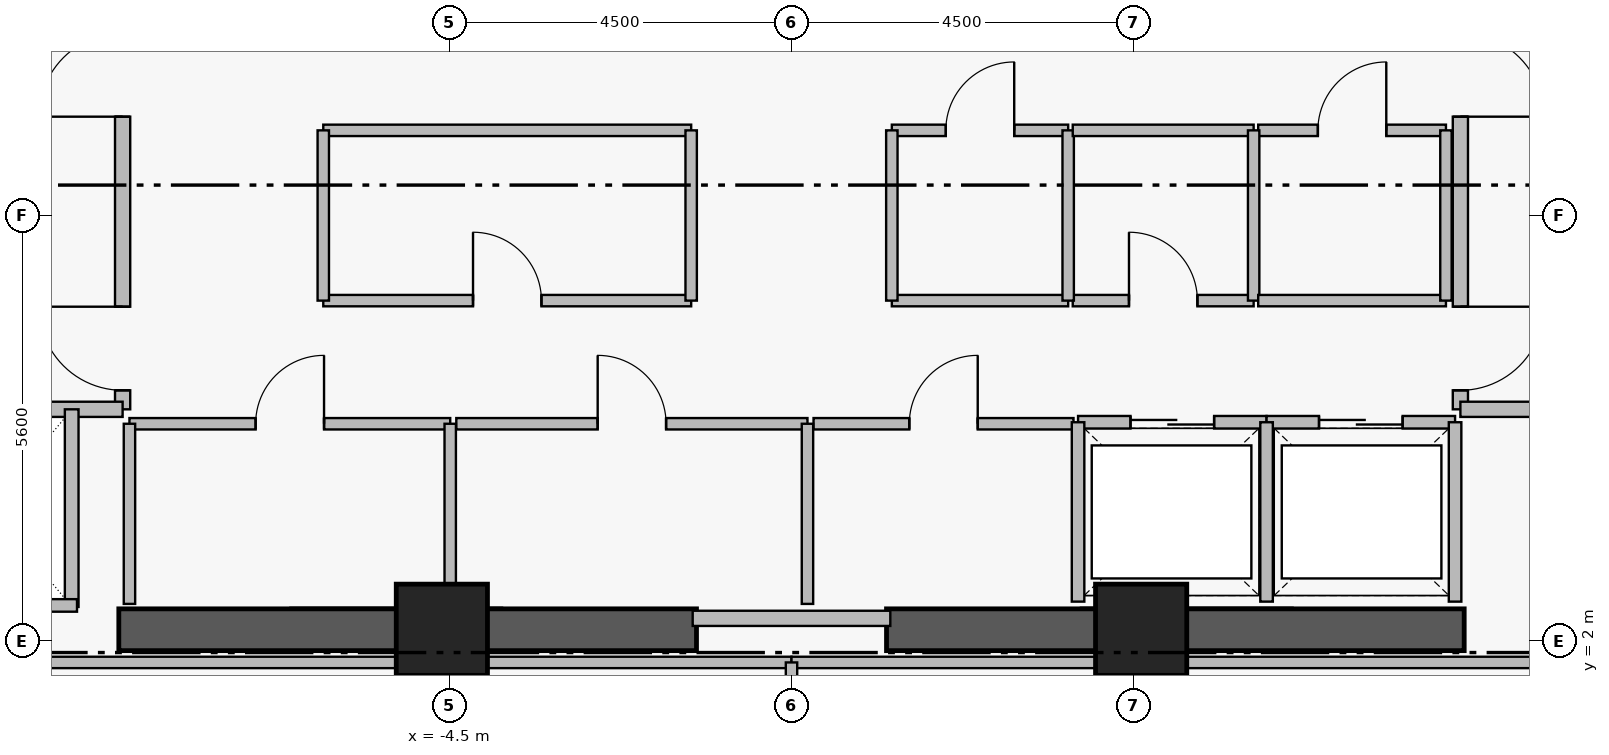
"""IFC4 building model, lengths in metres.
Left out: names, types, materials, properties, quantities, classifications, styles, units other than length and angle.
Written with IfcOpenShell. Run it as: python <this file> out.ifc"""

import sys

from ifc_helpers import new_model, si_unit, direction, frame, frame_2d, origin, origin_2d, place, context, subcontext, project, spatial, rectangle, extrude, element, fill, save


model = new_model("IFC4")
c1 = context("Model", 3, precision=1e-05, world=origin(), true_north=direction((0.0, 1.0)))
c2 = subcontext(c1, "Body", "Model", "MODEL_VIEW")
j1 = project(units=[si_unit("LENGTHUNIT", "METRE"), si_unit("PLANEANGLEUNIT", "RADIAN")], contexts=[c1])
p1 = place(None, origin())
s1 = spatial("IfcSite", under=j1, at=p1, CompositionType="ELEMENT")
p2 = place(p1, origin())
s2 = spatial("IfcBuilding", under=s1, at=p2, CompositionType="ELEMENT")
p3 = place(p2, frame((0.0, 0.0, 239.65)))
s3 = spatial("IfcBuildingStorey", under=s2, at=p3, CompositionType="ELEMENT", Elevation=239.65)
for number, where, z_axis, x_axis in (
    (1, (-8.85, 2.15, 0.0), (0.0, 0.0, 1.0), (1.0, 0.0, 0.0)),
    (2, (1.25, 2.15, 0.0), (0.0, 0.0, 1.0), (1.0, 0.0, 0.0)),
):
    element("IfcWall", number, at=place(p3, frame(where, z_axis=z_axis, x_axis=x_axis)), inside=s3, PredefinedType="SHEAR", context=c2, shape_type="SweptSolid", body=[
        extrude(rectangle(XDim=7.6, YDim=0.55, at=frame_2d((3.8, 0.0))), origin(), (0.0, 0.0, 1.0), 3.48),
    ])
for number, where, z_axis, x_axis in (
    (3, (-4.6, 2.15, 0.0), (0.0, 0.0, 1.0), (1.0, 0.0, 0.0)),
    (4, (4.6, 2.15, 0.0), (0.0, 0.0, 1.0), (1.0, 0.0, 0.0)),
):
    element("IfcColumn", number, at=place(p3, frame(where, z_axis=z_axis, x_axis=x_axis)), inside=s3, PredefinedType="COLUMN", context=c2, shape_type="SweptSolid", body=[
        extrude(rectangle(XDim=1.2, YDim=1.2, at=origin_2d()), origin(), (0.0, 0.0, 1.0), 3.7),
    ])
p4 = place(p3, frame((-8.8, 5.05, 0.0), z_axis=(0.0, 0.0, 1.0), x_axis=(0.0, 1.0, 0.0)))
e5 = element("IfcWall", 5, at=p4, inside=s3, PredefinedType="PARTITIONING", context=c2, shape_type="SweptSolid", body=[
    extrude(rectangle(XDim=6.1, YDim=0.2, at=frame_2d((3.05, 0.0))), origin(), (0.0, 0.0, 1.0), 3.48),
])
p5 = place(p4, frame((0.25, 0.0, 0.0)))
e6 = element("IfcOpeningElement", 6, at=p5, cuts=e5, PredefinedType="OPENING", context=c2, shape_type="SweptSolid", body=[
    extrude(rectangle(XDim=1.1, YDim=2.2, at=frame_2d((0.55, 1.1))), frame((0.0, 0.11, 0.0), z_axis=(0.0, -1.0, 0.0), x_axis=(1.0, 0.0, 0.0)), (0.0, 0.0, 1.0), 0.22),
])
p6 = place(p4, frame((3.85, 0.0, 0.0)))
e7 = element("IfcOpeningElement", 7, at=p6, cuts=e5, PredefinedType="OPENING", context=c2, shape_type="SweptSolid", body=[
    extrude(rectangle(XDim=1.1, YDim=2.2, at=frame_2d((0.55, 1.1))), frame((0.0, 0.11, 0.0), z_axis=(0.0, -1.0, 0.0), x_axis=(1.0, 0.0, 0.0)), (0.0, 0.0, 1.0), 0.22),
])
p7 = place(p3, frame((8.8, 11.15, 0.0), z_axis=(0.0, 0.0, 1.0), x_axis=(0.0, -1.0, 0.0)))
e8 = element("IfcWall", 8, at=p7, inside=s3, PredefinedType="PARTITIONING", context=c2, shape_type="SweptSolid", body=[
    extrude(rectangle(XDim=6.1, YDim=0.2, at=frame_2d((3.05, 0.0))), origin(), (0.0, 0.0, 1.0), 3.48),
])
p8 = place(p7, frame((1.15, 0.0, 0.0)))
e9 = element("IfcOpeningElement", 9, at=p8, cuts=e8, PredefinedType="OPENING", context=c2, shape_type="SweptSolid", body=[
    extrude(rectangle(XDim=1.1, YDim=2.2, at=frame_2d((0.55, 1.1))), frame((0.0, 0.11, 0.0), z_axis=(0.0, -1.0, 0.0), x_axis=(1.0, 0.0, 0.0)), (0.0, 0.0, 1.0), 0.22),
])
p9 = place(p7, frame((4.75, 0.0, 0.0)))
e10 = element("IfcOpeningElement", 10, at=p9, cuts=e8, PredefinedType="OPENING", context=c2, shape_type="SweptSolid", body=[
    extrude(rectangle(XDim=1.1, YDim=2.2, at=frame_2d((0.55, 1.1))), frame((0.0, 0.11, 0.0), z_axis=(0.0, -1.0, 0.0), x_axis=(1.0, 0.0, 0.0)), (0.0, 0.0, 1.0), 0.22),
])
p10 = place(p3, frame((3.77, 4.88, 0.0), z_axis=(0.0, 0.0, 1.0), x_axis=(1.0, 0.0, 0.0)))
e11 = element("IfcWall", 11, at=p10, inside=s3, PredefinedType="PARTITIONING", context=c2, shape_type="SweptSolid", body=[
    extrude(rectangle(XDim=2.48, YDim=0.165, at=frame_2d((1.24, 0.0))), origin(), (0.0, 0.0, 1.0), 3.48),
])
p11 = place(p10, frame((0.69, 0.0, 0.0)))
e12 = element("IfcOpeningElement", 12, at=p11, cuts=e11, PredefinedType="OPENING", context=c2, shape_type="SweptSolid", body=[
    extrude(rectangle(XDim=1.1, YDim=2.25, at=frame_2d((0.55, 1.125))), frame((0.0, 0.093, 0.0), z_axis=(0.0, -1.0, 0.0), x_axis=(1.0, 0.0, 0.0)), (0.0, 0.0, 1.0), 0.185),
])
p12 = place(p3, frame((6.25, 4.88, 0.0), z_axis=(0.0, 0.0, 1.0), x_axis=(1.0, 0.0, 0.0)))
e13 = element("IfcWall", 13, at=p12, inside=s3, PredefinedType="PARTITIONING", context=c2, shape_type="SweptSolid", body=[
    extrude(rectangle(XDim=2.48, YDim=0.165, at=frame_2d((1.24, 0.0))), origin(), (0.0, 0.0, 1.0), 3.48),
])
p13 = place(p12, frame((0.69, 0.0, 0.0)))
e14 = element("IfcOpeningElement", 14, at=p13, cuts=e13, PredefinedType="OPENING", context=c2, shape_type="SweptSolid", body=[
    extrude(rectangle(XDim=1.1, YDim=2.25, at=frame_2d((0.55, 1.125))), frame((0.0, 0.093, 0.0), z_axis=(0.0, -1.0, 0.0), x_axis=(1.0, 0.0, 0.0)), (0.0, 0.0, 1.0), 0.185),
])
p14 = place(p3, frame((-8.71, 4.86, 0.0), z_axis=(0.0, 0.0, 1.0), x_axis=(1.0, 0.0, 0.0)))
e15 = element("IfcWall", 15, at=p14, inside=s3, PredefinedType="PARTITIONING", context=c2, shape_type="SweptSolid", body=[
    extrude(rectangle(XDim=4.22, YDim=0.15, at=frame_2d((2.11, 0.0))), origin(), (0.0, 0.0, 1.0), 3.48),
])
p15 = place(p14, frame((1.66, 0.0, 0.0)))
e16 = element("IfcOpeningElement", 16, at=p15, cuts=e15, PredefinedType="OPENING", context=c2, shape_type="SweptSolid", body=[
    extrude(rectangle(XDim=0.9, YDim=2.15, at=frame_2d((0.45, 1.075))), frame((0.0, 0.085, 0.0), z_axis=(0.0, -1.0, 0.0), x_axis=(1.0, 0.0, 0.0)), (0.0, 0.0, 1.0), 0.17),
])
p16 = place(p3, frame((-4.41, 4.86, 0.0), z_axis=(0.0, 0.0, 1.0), x_axis=(1.0, 0.0, 0.0)))
e17 = element("IfcWall", 17, at=p16, inside=s3, PredefinedType="PARTITIONING", context=c2, shape_type="SweptSolid", body=[
    extrude(rectangle(XDim=4.62, YDim=0.15, at=frame_2d((2.31, 0.0))), origin(), (0.0, 0.0, 1.0), 3.48),
])
p17 = place(p16, frame((1.86, 0.0, 0.0)))
e18 = element("IfcOpeningElement", 18, at=p17, cuts=e17, PredefinedType="OPENING", context=c2, shape_type="SweptSolid", body=[
    extrude(rectangle(XDim=0.9, YDim=2.15, at=frame_2d((0.45, 1.075))), frame((0.0, 0.085, 0.0), z_axis=(0.0, -1.0, 0.0), x_axis=(1.0, 0.0, 0.0)), (0.0, 0.0, 1.0), 0.17),
])
p18 = place(p3, frame((0.29, 4.86, 0.0), z_axis=(0.0, 0.0, 1.0), x_axis=(1.0, 0.0, 0.0)))
e19 = element("IfcWall", 19, at=p18, inside=s3, PredefinedType="PARTITIONING", context=c2, shape_type="SweptSolid", body=[
    extrude(rectangle(XDim=3.42, YDim=0.15, at=frame_2d((1.71, 0.0))), origin(), (0.0, 0.0, 1.0), 3.48),
])
p19 = place(p18, frame((1.26, 0.0, 0.0)))
e20 = element("IfcOpeningElement", 20, at=p19, cuts=e19, PredefinedType="OPENING", context=c2, shape_type="SweptSolid", body=[
    extrude(rectangle(XDim=0.9, YDim=2.15, at=frame_2d((0.45, 1.075))), frame((0.0, 0.085, 0.0), z_axis=(0.0, -1.0, 0.0), x_axis=(1.0, 0.0, 0.0)), (0.0, 0.0, 1.0), 0.17),
])
p20 = place(p3, frame((-6.16, 6.48, 0.0), z_axis=(0.0, 0.0, 1.0), x_axis=(1.0, 0.0, 0.0)))
e21 = element("IfcWall", 21, at=p20, inside=s3, PredefinedType="PARTITIONING", context=c2, shape_type="SweptSolid", body=[
    extrude(rectangle(XDim=4.84, YDim=0.15, at=frame_2d((2.42, 0.0))), origin(), (0.0, 0.0, 1.0), 3.48),
])
p21 = place(p20, frame((1.97, 0.0, 0.0)))
e22 = element("IfcOpeningElement", 22, at=p21, cuts=e21, PredefinedType="OPENING", context=c2, shape_type="SweptSolid", body=[
    extrude(rectangle(XDim=0.9, YDim=2.15, at=frame_2d((0.45, 1.075))), frame((0.0, 0.085, 0.0), z_axis=(0.0, -1.0, 0.0), x_axis=(1.0, 0.0, 0.0)), (0.0, 0.0, 1.0), 0.17),
])
p22 = place(p3, frame((1.32, 8.72, 0.0), z_axis=(0.0, 0.0, 1.0), x_axis=(1.0, 0.0, 0.0)))
e23 = element("IfcWall", 23, at=p22, inside=s3, PredefinedType="PARTITIONING", context=c2, shape_type="SweptSolid", body=[
    extrude(rectangle(XDim=2.32, YDim=0.15, at=frame_2d((1.16, 0.0))), origin(), (0.0, 0.0, 1.0), 3.48),
])
p23 = place(p22, frame((0.71, 0.0, 0.0)))
e24 = element("IfcOpeningElement", 24, at=p23, cuts=e23, PredefinedType="OPENING", context=c2, shape_type="SweptSolid", body=[
    extrude(rectangle(XDim=0.9, YDim=2.15, at=frame_2d((0.45, 1.075))), frame((0.0, 0.085, 0.0), z_axis=(0.0, -1.0, 0.0), x_axis=(1.0, 0.0, 0.0)), (0.0, 0.0, 1.0), 0.17),
])
p24 = place(p3, frame((3.7, 6.48, 0.0), z_axis=(0.0, 0.0, 1.0), x_axis=(1.0, 0.0, 0.0)))
e25 = element("IfcWall", 25, at=p24, inside=s3, PredefinedType="PARTITIONING", context=c2, shape_type="SweptSolid", body=[
    extrude(rectangle(XDim=2.38, YDim=0.15, at=frame_2d((1.19, 0.0))), origin(), (0.0, 0.0, 1.0), 3.48),
])
p25 = place(p24, frame((0.74, 0.0, 0.0)))
e26 = element("IfcOpeningElement", 26, at=p25, cuts=e25, PredefinedType="OPENING", context=c2, shape_type="SweptSolid", body=[
    extrude(rectangle(XDim=0.9, YDim=2.15, at=frame_2d((0.45, 1.075))), frame((0.0, 0.085, 0.0), z_axis=(0.0, -1.0, 0.0), x_axis=(1.0, 0.0, 0.0)), (0.0, 0.0, 1.0), 0.17),
])
p26 = place(p3, frame((6.14, 8.72, 0.0), z_axis=(0.0, 0.0, 1.0), x_axis=(1.0, 0.0, 0.0)))
e27 = element("IfcWall", 27, at=p26, inside=s3, PredefinedType="PARTITIONING", context=c2, shape_type="SweptSolid", body=[
    extrude(rectangle(XDim=2.47, YDim=0.15, at=frame_2d((1.235, 0.0))), origin(), (0.0, 0.0, 1.0), 3.48),
])
p27 = place(p26, frame((0.785, 0.0, 0.0)))
e28 = element("IfcOpeningElement", 28, at=p27, cuts=e27, PredefinedType="OPENING", context=c2, shape_type="SweptSolid", body=[
    extrude(rectangle(XDim=0.9, YDim=2.15, at=frame_2d((0.45, 1.075))), frame((0.0, 0.085, 0.0), z_axis=(0.0, -1.0, 0.0), x_axis=(1.0, 0.0, 0.0)), (0.0, 0.0, 1.0), 0.17),
])
for number, where, z_axis, x_axis in (
    (29, (-11.65, 5.05, 0.0), (0.0, 0.0, 1.0), (1.0, 0.0, 0.0)),
    (30, (8.8, 5.05, 0.0), (0.0, 0.0, 1.0), (1.0, 0.0, 0.0)),
):
    element("IfcWall", number, at=place(p3, frame(where, z_axis=z_axis, x_axis=x_axis)), inside=s3, PredefinedType="PARTITIONING", context=c2, shape_type="SweptSolid", body=[
        extrude(rectangle(XDim=2.85, YDim=0.2, at=frame_2d((1.425, 0.0))), origin(), (0.0, 0.0, 1.0), 3.48),
    ])
for number, where, z_axis, x_axis in (
    (31, (3.77, 2.52, 0.0), (0.0, 0.0, 1.0), (0.0, 1.0, 0.0)),
    (32, (6.25, 2.52, 0.0), (0.0, 0.0, 1.0), (0.0, 1.0, 0.0)),
    (33, (8.73, 2.52, 0.0), (0.0, 0.0, 1.0), (0.0, 1.0, 0.0)),
):
    element("IfcWall", number, at=place(p3, frame(where, z_axis=z_axis, x_axis=x_axis)), inside=s3, PredefinedType="PARTITIONING", context=c2, shape_type="SweptSolid", body=[
        extrude(rectangle(XDim=2.36, YDim=0.165, at=frame_2d((1.18, 0.0))), origin(), (0.0, 0.0, 1.0), 3.48),
    ])
p28 = place(p3, frame((-1.3, 2.3, 0.0), z_axis=(0.0, 0.0, 1.0), x_axis=(1.0, 0.0, 0.0)))
e34 = element("IfcWall", 34, at=p28, inside=s3, PredefinedType="PARTITIONING", context=c2, shape_type="SweptSolid", body=[
    extrude(rectangle(XDim=2.6, YDim=0.2, at=frame_2d((1.3, 0.0))), origin(), (0.0, 0.0, 1.0), 2.38),
])
for number, where, z_axis, x_axis in (
    (35, (-8.71, 2.49, 0.0), (0.0, 0.0, 1.0), (0.0, 1.0, 0.0)),
    (36, (-4.49, 2.49, 0.0), (0.0, 0.0, 1.0), (0.0, 1.0, 0.0)),
    (37, (0.21, 2.49, 0.0), (0.0, 0.0, 1.0), (0.0, 1.0, 0.0)),
):
    element("IfcWall", number, at=place(p3, frame(where, z_axis=z_axis, x_axis=x_axis)), inside=s3, PredefinedType="PARTITIONING", context=c2, shape_type="SweptSolid", body=[
        extrude(rectangle(XDim=2.37, YDim=0.15, at=frame_2d((1.185, 0.0))), origin(), (0.0, 0.0, 1.0), 3.48),
    ])
p29 = place(p3, frame((-9.47, 2.45, 0.0), z_axis=(0.0, 0.0, 1.0), x_axis=(0.0, 1.0, 0.0)))
e38 = element("IfcWall", 38, at=p29, inside=s3, PredefinedType="PARTITIONING", context=c2, shape_type="SweptSolid", body=[
    extrude(rectangle(XDim=2.6, YDim=0.18, at=frame_2d((1.3, 0.0))), origin(), (0.0, 0.0, 1.0), 3.48),
])
p30 = place(p3, frame((-11.71, 2.47, 0.0), z_axis=(0.0, 0.0, 1.0), x_axis=(1.0, 0.0, 0.0)))
e39 = element("IfcWall", 39, at=p30, inside=s3, PredefinedType="PARTITIONING", context=c2, shape_type="SweptSolid", body=[
    extrude(rectangle(XDim=2.31, YDim=0.165, at=frame_2d((1.155, 0.0))), origin(), (0.0, 0.0, 1.0), 2.38),
])
p31 = place(p3, frame((-6.16, 8.72, 0.0), z_axis=(0.0, 0.0, 1.0), x_axis=(1.0, 0.0, 0.0)))
e40 = element("IfcWall", 40, at=p31, inside=s3, PredefinedType="PARTITIONING", context=c2, shape_type="SweptSolid", body=[
    extrude(rectangle(XDim=4.84, YDim=0.15, at=frame_2d((2.42, 0.0))), origin(), (0.0, 0.0, 1.0), 3.48),
])
for number, where, z_axis, x_axis in (
    (41, (-6.16, 6.48, 0.0), (0.0, 0.0, 1.0), (0.0, 1.0, 0.0)),
    (42, (-1.32, 6.48, 0.0), (0.0, 0.0, 1.0), (0.0, 1.0, 0.0)),
):
    element("IfcWall", number, at=place(p3, frame(where, z_axis=z_axis, x_axis=x_axis)), inside=s3, PredefinedType="PARTITIONING", context=c2, shape_type="SweptSolid", body=[
        extrude(rectangle(XDim=2.24, YDim=0.15, at=frame_2d((1.12, 0.0))), origin(), (0.0, 0.0, 1.0), 3.48),
    ])
p32 = place(p3, frame((1.32, 6.48, 0.0), z_axis=(0.0, 0.0, 1.0), x_axis=(1.0, 0.0, 0.0)))
e43 = element("IfcWall", 43, at=p32, inside=s3, PredefinedType="PARTITIONING", context=c2, shape_type="SweptSolid", body=[
    extrude(rectangle(XDim=2.32, YDim=0.15, at=frame_2d((1.16, 0.0))), origin(), (0.0, 0.0, 1.0), 3.48),
])
for number, where, z_axis, x_axis in (
    (44, (1.32, 6.48, 0.0), (0.0, 0.0, 1.0), (0.0, 1.0, 0.0)),
    (45, (3.64, 6.48, 0.0), (0.0, 0.0, 1.0), (0.0, 1.0, 0.0)),
):
    element("IfcWall", number, at=place(p3, frame(where, z_axis=z_axis, x_axis=x_axis)), inside=s3, PredefinedType="PARTITIONING", context=c2, shape_type="SweptSolid", body=[
        extrude(rectangle(XDim=2.24, YDim=0.15, at=frame_2d((1.12, 0.0))), origin(), (0.0, 0.0, 1.0), 3.48),
    ])
p33 = place(p3, frame((3.7, 8.72, 0.0), z_axis=(0.0, 0.0, 1.0), x_axis=(1.0, 0.0, 0.0)))
e46 = element("IfcWall", 46, at=p33, inside=s3, PredefinedType="PARTITIONING", context=c2, shape_type="SweptSolid", body=[
    extrude(rectangle(XDim=2.38, YDim=0.15, at=frame_2d((1.19, 0.0))), origin(), (0.0, 0.0, 1.0), 3.48),
])
p34 = place(p3, frame((6.08, 6.48, 0.0), z_axis=(0.0, 0.0, 1.0), x_axis=(0.0, 1.0, 0.0)))
e47 = element("IfcWall", 47, at=p34, inside=s3, PredefinedType="PARTITIONING", context=c2, shape_type="SweptSolid", body=[
    extrude(rectangle(XDim=2.24, YDim=0.15, at=frame_2d((1.12, 0.0))), origin(), (0.0, 0.0, 1.0), 3.48),
])
p35 = place(p3, frame((6.14, 6.48, 0.0), z_axis=(0.0, 0.0, 1.0), x_axis=(1.0, 0.0, 0.0)))
e48 = element("IfcWall", 48, at=p35, inside=s3, PredefinedType="PARTITIONING", context=c2, shape_type="SweptSolid", body=[
    extrude(rectangle(XDim=2.47, YDim=0.15, at=frame_2d((1.235, 0.0))), origin(), (0.0, 0.0, 1.0), 3.48),
])
p36 = place(p3, frame((8.61, 6.48, 0.0), z_axis=(0.0, 0.0, 1.0), x_axis=(0.0, 1.0, 0.0)))
e49 = element("IfcWall", 49, at=p36, inside=s3, PredefinedType="PARTITIONING", context=c2, shape_type="SweptSolid", body=[
    extrude(rectangle(XDim=2.24, YDim=0.15, at=frame_2d((1.12, 0.0))), origin(), (0.0, 0.0, 1.0), 3.48),
])
for number, where, z_axis, x_axis in (
    (50, (-11.68, 1.72, 0.0), (0.0, 0.0, 1.0), (1.0, 0.0, 0.0)),
    (51, (0.0, 1.72, 0.0), (0.0, 0.0, 1.0), (1.0, 0.0, 0.0)),
):
    element("IfcWall", number, at=place(p3, frame(where, z_axis=z_axis, x_axis=x_axis)), inside=s3, PredefinedType="PARTITIONING", context=c2, shape_type="SweptSolid", body=[
        extrude(rectangle(XDim=11.68, YDim=0.15, at=frame_2d((5.84, 0.0))), origin(), (0.0, 0.0, 1.0), 2.38),
    ])
p37 = place(p3, frame((0.0, 0.06, 0.0), z_axis=(0.0, 0.0, 1.0), x_axis=(0.0, 1.0, 0.0)))
e52 = element("IfcWall", 52, at=p37, inside=s3, PredefinedType="PARTITIONING", context=c2, shape_type="SweptSolid", body=[
    extrude(rectangle(XDim=1.66, YDim=0.15, at=frame_2d((0.83, 0.0))), origin(), (0.0, 0.0, 1.0), 3.48),
])
p38 = place(p5, origin())
e53 = element("IfcDoor", 53, at=p38, inside=s3, OperationType="SINGLE_SWING_RIGHT", PredefinedType="DOOR", context=c2, shape_type="SweptSolid", body=[
    extrude(rectangle(XDim=1.1, YDim=2.2, at=frame_2d((0.55, 1.1))), frame((0.0, 0.025, 0.0), z_axis=(0.0, -1.0, 0.0), x_axis=(1.0, 0.0, 0.0)), (0.0, 0.0, 1.0), 0.05),
])
fill(e6, e53)
p39 = place(p6, origin())
e54 = element("IfcDoor", 54, at=p39, inside=s3, OperationType="SINGLE_SWING_LEFT", PredefinedType="DOOR", context=c2, shape_type="SweptSolid", body=[
    extrude(rectangle(XDim=1.1, YDim=2.2, at=frame_2d((0.55, 1.1))), frame((0.0, 0.025, 0.0), z_axis=(0.0, -1.0, 0.0), x_axis=(1.0, 0.0, 0.0)), (0.0, 0.0, 1.0), 0.05),
])
fill(e7, e54)
p40 = place(p8, origin())
e55 = element("IfcDoor", 55, at=p40, inside=s3, OperationType="SINGLE_SWING_RIGHT", PredefinedType="DOOR", context=c2, shape_type="SweptSolid", body=[
    extrude(rectangle(XDim=1.1, YDim=2.2, at=frame_2d((0.55, 1.1))), frame((0.0, 0.025, 0.0), z_axis=(0.0, -1.0, 0.0), x_axis=(1.0, 0.0, 0.0)), (0.0, 0.0, 1.0), 0.05),
])
fill(e9, e55)
p41 = place(p9, origin())
e56 = element("IfcDoor", 56, at=p41, inside=s3, OperationType="SINGLE_SWING_LEFT", PredefinedType="DOOR", context=c2, shape_type="SweptSolid", body=[
    extrude(rectangle(XDim=1.1, YDim=2.2, at=frame_2d((0.55, 1.1))), frame((0.0, 0.025, 0.0), z_axis=(0.0, -1.0, 0.0), x_axis=(1.0, 0.0, 0.0)), (0.0, 0.0, 1.0), 0.05),
])
fill(e10, e56)
p42 = place(p11, origin())
e57 = element("IfcDoor", 57, at=p42, inside=s3, OperationType="SLIDING_TO_LEFT", PredefinedType="DOOR", context=c2, shape_type="SweptSolid", body=[
    extrude(rectangle(XDim=1.1, YDim=2.25, at=frame_2d((0.55, 1.125))), frame((0.0, 0.025, 0.0), z_axis=(0.0, -1.0, 0.0), x_axis=(1.0, 0.0, 0.0)), (0.0, 0.0, 1.0), 0.05),
])
fill(e12, e57)
p43 = place(p13, origin())
e58 = element("IfcDoor", 58, at=p43, inside=s3, OperationType="SLIDING_TO_LEFT", PredefinedType="DOOR", context=c2, shape_type="SweptSolid", body=[
    extrude(rectangle(XDim=1.1, YDim=2.25, at=frame_2d((0.55, 1.125))), frame((0.0, 0.025, 0.0), z_axis=(0.0, -1.0, 0.0), x_axis=(1.0, 0.0, 0.0)), (0.0, 0.0, 1.0), 0.05),
])
fill(e14, e58)
p44 = place(p15, origin())
e59 = element("IfcDoor", 59, at=p44, inside=s3, OperationType="SINGLE_SWING_RIGHT", PredefinedType="DOOR", context=c2, shape_type="SweptSolid", body=[
    extrude(rectangle(XDim=0.9, YDim=2.15, at=frame_2d((0.45, 1.075))), frame((0.0, 0.025, 0.0), z_axis=(0.0, -1.0, 0.0), x_axis=(1.0, 0.0, 0.0)), (0.0, 0.0, 1.0), 0.05),
])
fill(e16, e59)
p45 = place(p17, origin())
e60 = element("IfcDoor", 60, at=p45, inside=s3, OperationType="SINGLE_SWING_LEFT", PredefinedType="DOOR", context=c2, shape_type="SweptSolid", body=[
    extrude(rectangle(XDim=0.9, YDim=2.15, at=frame_2d((0.45, 1.075))), frame((0.0, 0.025, 0.0), z_axis=(0.0, -1.0, 0.0), x_axis=(1.0, 0.0, 0.0)), (0.0, 0.0, 1.0), 0.05),
])
fill(e18, e60)
p46 = place(p19, origin())
e61 = element("IfcDoor", 61, at=p46, inside=s3, OperationType="SINGLE_SWING_RIGHT", PredefinedType="DOOR", context=c2, shape_type="SweptSolid", body=[
    extrude(rectangle(XDim=0.9, YDim=2.15, at=frame_2d((0.45, 1.075))), frame((0.0, 0.025, 0.0), z_axis=(0.0, -1.0, 0.0), x_axis=(1.0, 0.0, 0.0)), (0.0, 0.0, 1.0), 0.05),
])
fill(e20, e61)
p47 = place(p21, origin())
e62 = element("IfcDoor", 62, at=p47, inside=s3, OperationType="SINGLE_SWING_LEFT", PredefinedType="DOOR", context=c2, shape_type="SweptSolid", body=[
    extrude(rectangle(XDim=0.9, YDim=2.15, at=frame_2d((0.45, 1.075))), frame((0.0, 0.025, 0.0), z_axis=(0.0, -1.0, 0.0), x_axis=(1.0, 0.0, 0.0)), (0.0, 0.0, 1.0), 0.05),
])
fill(e22, e62)
p48 = place(p23, origin())
e63 = element("IfcDoor", 63, at=p48, inside=s3, OperationType="SINGLE_SWING_RIGHT", PredefinedType="DOOR", context=c2, shape_type="SweptSolid", body=[
    extrude(rectangle(XDim=0.9, YDim=2.15, at=frame_2d((0.45, 1.075))), frame((0.0, 0.025, 0.0), z_axis=(0.0, -1.0, 0.0), x_axis=(1.0, 0.0, 0.0)), (0.0, 0.0, 1.0), 0.05),
])
fill(e24, e63)
p49 = place(p25, origin())
e64 = element("IfcDoor", 64, at=p49, inside=s3, OperationType="SINGLE_SWING_LEFT", PredefinedType="DOOR", context=c2, shape_type="SweptSolid", body=[
    extrude(rectangle(XDim=0.9, YDim=2.15, at=frame_2d((0.45, 1.075))), frame((0.0, 0.025, 0.0), z_axis=(0.0, -1.0, 0.0), x_axis=(1.0, 0.0, 0.0)), (0.0, 0.0, 1.0), 0.05),
])
fill(e26, e64)
p50 = place(p27, origin())
e65 = element("IfcDoor", 65, at=p50, inside=s3, OperationType="SINGLE_SWING_RIGHT", PredefinedType="DOOR", context=c2, shape_type="SweptSolid", body=[
    extrude(rectangle(XDim=0.9, YDim=2.15, at=frame_2d((0.45, 1.075))), frame((0.0, 0.025, 0.0), z_axis=(0.0, -1.0, 0.0), x_axis=(1.0, 0.0, 0.0)), (0.0, 0.0, 1.0), 0.05),
])
fill(e28, e65)
save(model, sys.argv[1])
